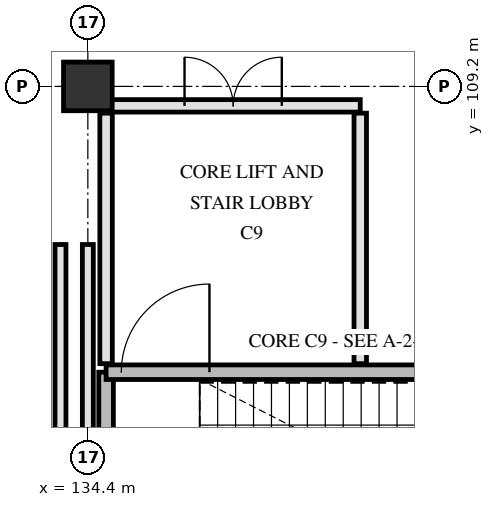
"""IFC4 building model, lengths in metres.
Left out: names, types, materials, properties, quantities, classifications, styles, units other than length and angle.
Written with IfcOpenShell. Run it as: python <this file> out.ifc"""

import sys

from ifc_helpers import new_model, si_unit, direction, frame, frame_2d, origin, origin_2d, place, context, subcontext, project, spatial, rectangle, extrude, element, fill, save


model = new_model("IFC4")
c1 = context("Model", 3, precision=1e-05, world=origin(), true_north=direction((0.0, 1.0)))
c2 = subcontext(c1, "Body", "Model", "MODEL_VIEW")
j1 = project(units=[si_unit("LENGTHUNIT", "METRE"), si_unit("PLANEANGLEUNIT", "RADIAN")], contexts=[c1])
p1 = place(None, origin())
s1 = spatial("IfcSite", under=j1, at=p1, CompositionType="ELEMENT")
p2 = place(p1, origin())
s2 = spatial("IfcBuilding", under=s1, at=p2, CompositionType="ELEMENT")
p3 = place(p2, origin())
s3 = spatial("IfcBuildingStorey", under=s2, at=p3, CompositionType="ELEMENT", Elevation=0.0)
p4 = place(p3, frame((134.4, 109.2, 0.0), z_axis=(0.0, 0.0, 1.0), x_axis=(1.0, 0.0, 0.0)))
e1 = element("IfcColumn", 1, at=p4, inside=s3, PredefinedType="COLUMN", context=c2, shape_type="SweptSolid", body=[
    extrude(rectangle(XDim=0.8, YDim=0.8, at=origin_2d()), origin(), (0.0, 0.0, 1.0), 4.8),
])
p5 = place(p3, frame((134.7, 101.18, 0.0), z_axis=(0.0, 0.0, 1.0), x_axis=(0.0, 1.0, 0.0)))
e2 = element("IfcWall", 2, at=p5, inside=s3, PredefinedType="SHEAR", context=c2, shape_type="SweptSolid", body=[
    extrude(rectangle(XDim=3.32, YDim=0.24, at=frame_2d((1.66, 0.0))), origin(), (0.0, 0.0, 1.0), 4.5),
])
p6 = place(p3, frame((134.7, 104.5, 0.0), z_axis=(0.0, 0.0, 1.0), x_axis=(1.0, 0.0, 0.0)))
e3 = element("IfcWall", 3, at=p6, inside=s3, PredefinedType="SHEAR", context=c2, shape_type="SweptSolid", body=[
    extrude(rectangle(XDim=7.82, YDim=0.24, at=frame_2d((3.91, 0.0))), origin(), (0.0, 0.0, 1.0), 4.5),
])
p7 = place(p6, frame((0.25, 0.0, 0.0)))
e4 = element("IfcOpeningElement", 4, at=p7, cuts=e3, PredefinedType="OPENING", context=c2, shape_type="SweptSolid", body=[
    extrude(rectangle(XDim=1.45, YDim=2.2, at=frame_2d((0.725, 1.1))), frame((0.0, 0.13, 0.0), z_axis=(0.0, -1.0, 0.0), x_axis=(1.0, 0.0, 0.0)), (0.0, 0.0, 1.0), 0.26),
])
p8 = place(p3, frame((138.88, 104.64, 0.0), z_axis=(0.0, 0.0, 1.0), x_axis=(0.0, 1.0, 0.0)))
e5 = element("IfcWall", 5, at=p8, inside=s3, PredefinedType="PARTITIONING", context=c2, shape_type="SweptSolid", body=[
    extrude(rectangle(XDim=4.12, YDim=0.205, at=frame_2d((2.06, 0.0))), origin(), (0.0, 0.0, 1.0), 4.49),
])
p9 = place(p3, frame((134.7, 104.64, 0.0), z_axis=(0.0, 0.0, 1.0), x_axis=(0.0, 1.0, 0.0)))
e6 = element("IfcWall", 6, at=p9, inside=s3, PredefinedType="PARTITIONING", context=c2, shape_type="SweptSolid", body=[
    extrude(rectangle(XDim=4.12, YDim=0.205, at=frame_2d((2.06, 0.0))), origin(), (0.0, 0.0, 1.0), 3.89),
])
p10 = place(p3, frame((134.7, 108.88, 0.0), z_axis=(0.0, 0.0, 1.0), x_axis=(1.0, 0.0, 0.0)))
e7 = element("IfcWall", 7, at=p10, inside=s3, PredefinedType="PARTITIONING", context=c2, shape_type="SweptSolid", body=[
    extrude(rectangle(XDim=4.18, YDim=0.205, at=frame_2d((2.09, 0.0))), origin(), (0.0, 0.0, 1.0), 3.84),
])
p11 = place(p10, frame((1.29, 0.0, 0.0)))
e8 = element("IfcOpeningElement", 8, at=p11, cuts=e7, PredefinedType="OPENING", context=c2, shape_type="SweptSolid", body=[
    extrude(rectangle(XDim=1.6, YDim=2.25, at=frame_2d((0.8, 1.125))), frame((0.0, 0.113, 0.0), z_axis=(0.0, -1.0, 0.0), x_axis=(1.0, 0.0, 0.0)), (0.0, 0.0, 1.0), 0.225),
])
p12 = place(p3, frame((133.95, 101.465, 0.0), z_axis=(0.0, 0.0, 1.0), x_axis=(0.0, 1.0, 0.0)))
e9 = element("IfcWall", 9, at=p12, inside=s3, PredefinedType="PARTITIONING", context=c2, shape_type="SweptSolid", body=[
    extrude(rectangle(XDim=5.135, YDim=0.18, at=frame_2d((2.567, 0.0))), origin(), (0.0, 0.0, 1.0), 4.49),
])
p13 = place(p3, frame((134.4, 101.195, 0.0), z_axis=(0.0, 0.0, 1.0), x_axis=(0.0, 1.0, 0.0)))
e10 = element("IfcWall", 10, at=p13, inside=s3, PredefinedType="PARTITIONING", context=c2, shape_type="SweptSolid", body=[
    extrude(rectangle(XDim=5.405, YDim=0.18, at=frame_2d((2.703, 0.0))), origin(), (0.0, 0.0, 1.0), 3.89),
])
p14 = place(p7, origin())
e11 = element("IfcDoor", 11, at=p14, inside=s3, OperationType="SINGLE_SWING_RIGHT", PredefinedType="DOOR", context=c2, shape_type="SweptSolid", body=[
    extrude(rectangle(XDim=1.45, YDim=2.2, at=frame_2d((0.725, 1.1))), frame((0.0, 0.025, 0.0), z_axis=(0.0, -1.0, 0.0), x_axis=(1.0, 0.0, 0.0)), (0.0, 0.0, 1.0), 0.05),
])
fill(e4, e11)
p15 = place(p11, origin())
e12 = element("IfcDoor", 12, at=p15, inside=s3, OperationType="DOUBLE_SWING_LEFT", PredefinedType="DOOR", context=c2, shape_type="SweptSolid", body=[
    extrude(rectangle(XDim=1.6, YDim=2.25, at=frame_2d((0.8, 1.125))), frame((0.0, 0.025, 0.0), z_axis=(0.0, -1.0, 0.0), x_axis=(1.0, 0.0, 0.0)), (0.0, 0.0, 1.0), 0.05),
])
fill(e8, e12)
save(model, sys.argv[1])
